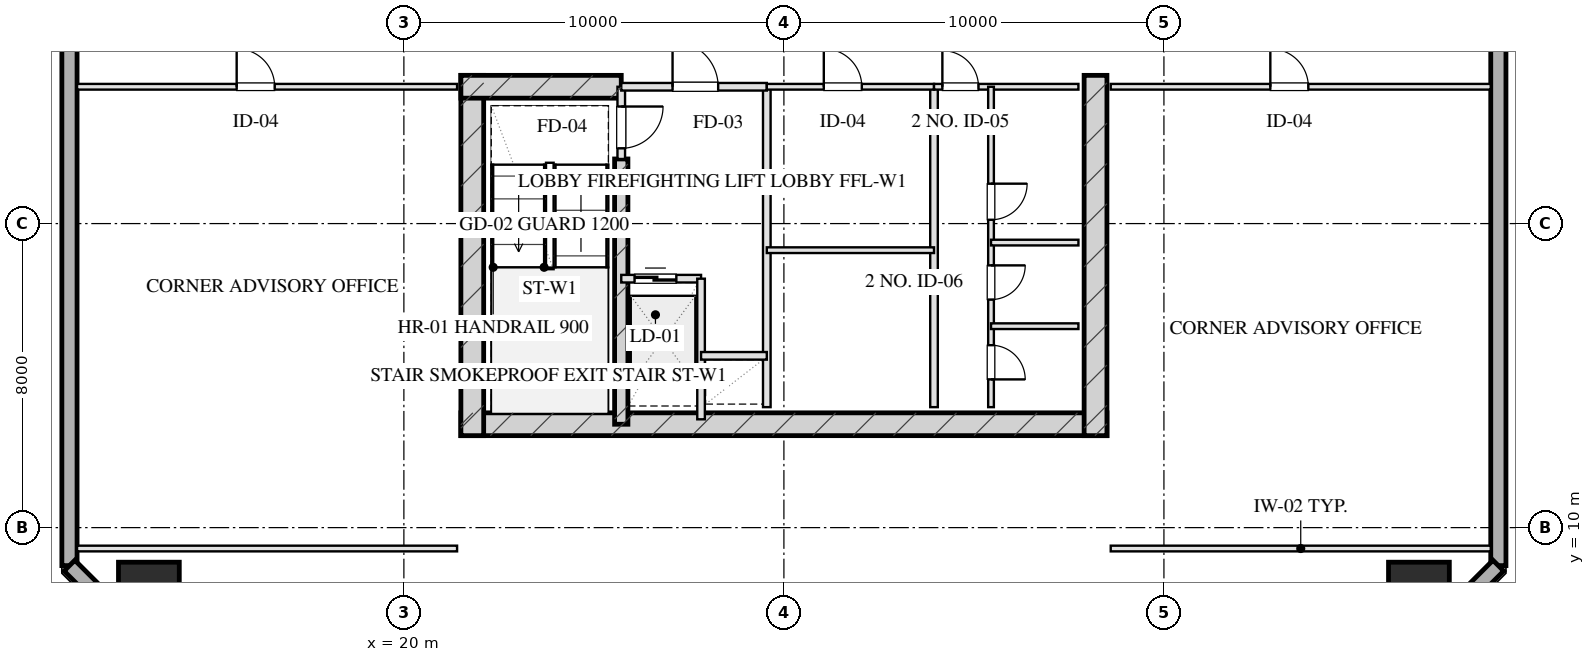
"""IFC4 building model, lengths in metres.
Left out: names, types, materials, properties, quantities, classifications, styles, units other than length and angle.
Written with IfcOpenShell. Run it as: python <this file> out.ifc"""

import sys

from ifc_helpers import new_model, si_unit, direction, frame, frame_2d, origin, origin_2d, place, context, subcontext, project, spatial, rectangle, hollow_rectangle, extrude, element, fill, save


model = new_model("IFC4")
c1 = context("Model", 3, precision=1e-05, world=origin(), true_north=direction((0.0, 1.0)))
c2 = subcontext(c1, "Body", "Model", "MODEL_VIEW")
j1 = project(units=[si_unit("LENGTHUNIT", "METRE"), si_unit("PLANEANGLEUNIT", "RADIAN")], contexts=[c1])
p1 = place(None, origin())
s1 = spatial("IfcSite", under=j1, at=p1, CompositionType="ELEMENT")
p2 = place(p1, origin())
s2 = spatial("IfcBuilding", under=s1, at=p2, CompositionType="ELEMENT")
p3 = place(p2, frame((0.0, 0.0, 106.95)))
s3 = spatial("IfcBuildingStorey", under=s2, at=p3, CompositionType="ELEMENT", Elevation=106.95)
p4 = place(p3, frame((21.5, 12.72, 0.0), z_axis=(0.0, 0.0, 1.0), x_axis=(1.0, 0.0, 0.0)))
e1 = element("IfcWall", 1, at=p4, inside=s3, PredefinedType="SHEAR", context=c2, shape_type="SweptSolid", body=[
    extrude(rectangle(XDim=17.0, YDim=0.6, at=frame_2d((8.5, 0.0))), origin(), (0.0, 0.0, 1.0), 3.45),
])
for number, where, z_axis, x_axis in (
    (2, (21.8, 21.9, 0.0), (0.0, 0.0, 1.0), (0.0, -1.0, 0.0)),
    (3, (38.2, 21.9, 0.0), (0.0, 0.0, 1.0), (0.0, -1.0, 0.0)),
):
    element("IfcWall", number, at=place(p3, frame(where, z_axis=z_axis, x_axis=x_axis)), inside=s3, PredefinedType="SHEAR", context=c2, shape_type="SweptSolid", body=[
        extrude(rectangle(XDim=9.48, YDim=0.6, at=frame_2d((4.74, 0.0))), origin(), (0.0, 0.0, 1.0), 3.45),
    ])
p5 = place(p3, frame((25.72, 19.7, 0.0), z_axis=(0.0, 0.0, 1.0), x_axis=(0.0, -1.0, 0.0)))
e4 = element("IfcWall", 4, at=p5, inside=s3, PredefinedType="SHEAR", context=c2, shape_type="SweptSolid", body=[
    extrude(rectangle(XDim=6.98, YDim=0.35, at=frame_2d((3.49, 0.0))), origin(), (0.0, 0.0, 1.0), 3.45),
])
p6 = place(p3, frame((21.5, 21.6, 0.0), z_axis=(0.0, 0.0, 1.0), x_axis=(1.0, 0.0, 0.0)))
e5 = element("IfcWall", 5, at=p6, inside=s3, PredefinedType="SHEAR", context=c2, shape_type="SweptSolid", body=[
    extrude(rectangle(XDim=4.22, YDim=0.6, at=frame_2d((2.11, 0.0))), origin(), (0.0, 0.0, 1.0), 3.45),
])
for number, where, z_axis, x_axis in (
    (6, (13.29, 8.29, 0.0), (0.0, 0.0, 1.0), (1.0, 0.0, 0.0)),
    (7, (46.71, 8.29, 0.0), (0.0, 0.0, 1.0), (1.0, 0.0, 0.0)),
):
    element("IfcColumn", number, at=place(p3, frame(where, z_axis=z_axis, x_axis=x_axis)), inside=s3, PredefinedType="COLUMN", context=c2, shape_type="SweptSolid", body=[
        extrude(hollow_rectangle(XDim=1.6, YDim=1.6, WallThickness=0.055, at=origin_2d()), origin(), (0.0, 0.0, 1.0), 3.451),
    ])
p7 = place(p3, frame((11.2, 9.0, 0.0), z_axis=(0.0, 0.0, 1.0), x_axis=(0.0, 1.0, 0.0)))
e8 = element("IfcWall", 8, at=p7, inside=s3, PredefinedType="SOLIDWALL", context=c2, shape_type="SweptSolid", body=[
    extrude(rectangle(XDim=50.0, YDim=0.4, at=frame_2d((25.0, 0.0))), origin(), (0.0, 0.0, 1.0), 2.61),
])
p8 = place(p7, frame((26.4, 0.0, 0.75)))
e9 = element("IfcOpeningElement", 9, at=p8, cuts=e8, PredefinedType="OPENING", context=c2, shape_type="SweptSolid", body=[
    extrude(rectangle(XDim=2.4, YDim=1.46, at=frame_2d((1.2, 0.73))), frame((0.0, 0.21, 0.0), z_axis=(0.0, -1.0, 0.0), x_axis=(1.0, 0.0, 0.0)), (0.0, 0.0, 1.0), 0.42),
])
p9 = place(p3, frame((48.8, 59.0, 0.0), z_axis=(0.0, 0.0, 1.0), x_axis=(0.0, -1.0, 0.0)))
e10 = element("IfcWall", 10, at=p9, inside=s3, PredefinedType="SOLIDWALL", context=c2, shape_type="SweptSolid", body=[
    extrude(rectangle(XDim=50.0, YDim=0.4, at=frame_2d((25.0, 0.0))), origin(), (0.0, 0.0, 1.0), 2.61),
])
p10 = place(p9, frame((30.2, 0.0, 0.75)))
e11 = element("IfcOpeningElement", 11, at=p10, cuts=e10, PredefinedType="OPENING", context=c2, shape_type="SweptSolid", body=[
    extrude(rectangle(XDim=2.4, YDim=1.46, at=frame_2d((1.2, 0.73))), frame((0.0, 0.21, 0.0), z_axis=(0.0, -1.0, 0.0), x_axis=(1.0, 0.0, 0.0)), (0.0, 0.0, 1.0), 0.42),
])
p11 = place(p9, frame((17.4, 0.0, 0.75)))
e12 = element("IfcOpeningElement", 12, at=p11, cuts=e10, PredefinedType="OPENING", context=c2, shape_type="SweptSolid", body=[
    extrude(rectangle(XDim=2.4, YDim=1.46, at=frame_2d((1.2, 0.73))), frame((0.0, 0.21, 0.0), z_axis=(0.0, -1.0, 0.0), x_axis=(1.0, 0.0, 0.0)), (0.0, 0.0, 1.0), 0.42),
])
for number, where, z_axis, x_axis in (
    (13, (48.8, 9.0, 0.0), (0.0, 0.0, 1.0), (-0.707, -0.707, 0.0)),
    (14, (14.0, 6.2, 0.0), (0.0, 0.0, 1.0), (-0.707, 0.707, 0.0)),
):
    element("IfcWall", number, at=place(p3, frame(where, z_axis=z_axis, x_axis=x_axis)), inside=s3, PredefinedType="SOLIDWALL", context=c2, shape_type="SweptSolid", body=[
        extrude(rectangle(XDim=3.96, YDim=0.4, at=frame_2d((1.98, 0.0))), origin(), (0.0, 0.0, 1.0), 2.61),
    ])
p12 = place(p3, frame((25.72, 21.6, 0.0), z_axis=(0.0, 0.0, 1.0), x_axis=(0.0, -1.0, 0.0)))
e15 = element("IfcWall", 15, at=p12, inside=s3, PredefinedType="PARTITIONING", context=c2, shape_type="SweptSolid", body=[
    extrude(rectangle(XDim=1.9, YDim=0.2, at=frame_2d((0.95, 0.0))), origin(), (0.0, 0.0, 1.0), 3.175),
])
p13 = place(p12, frame((0.52, 0.0, 0.0)))
e16 = element("IfcOpeningElement", 16, at=p13, cuts=e15, PredefinedType="OPENING", context=c2, shape_type="SweptSolid", body=[
    extrude(rectangle(XDim=1.1, YDim=2.05, at=frame_2d((0.55, 1.025))), frame((0.0, 0.11, 0.0), z_axis=(0.0, -1.0, 0.0), x_axis=(1.0, 0.0, 0.0)), (0.0, 0.0, 1.0), 0.22),
])
p14 = place(p3, frame((29.55, 21.6, 0.0), z_axis=(0.0, 0.0, 1.0), x_axis=(0.0, -1.0, 0.0)))
e17 = element("IfcWall", 17, at=p14, inside=s3, PredefinedType="PARTITIONING", context=c2, shape_type="SweptSolid", body=[
    extrude(rectangle(XDim=8.43, YDim=0.2, at=frame_2d((4.215, 0.0))), origin(), (0.0, 0.0, 1.0), 3.175),
])
p15 = place(p3, frame((25.72, 21.6, 0.0), z_axis=(0.0, 0.0, 1.0), x_axis=(1.0, 0.0, 0.0)))
e18 = element("IfcWall", 18, at=p15, inside=s3, PredefinedType="PARTITIONING", context=c2, shape_type="SweptSolid", body=[
    extrude(rectangle(XDim=3.83, YDim=0.2, at=frame_2d((1.915, 0.0))), origin(), (0.0, 0.0, 1.0), 3.175),
])
p16 = place(p15, frame((1.35, 0.0, 0.0)))
e19 = element("IfcOpeningElement", 19, at=p16, cuts=e18, PredefinedType="OPENING", context=c2, shape_type="SweptSolid", body=[
    extrude(rectangle(XDim=1.2, YDim=2.05, at=frame_2d((0.6, 1.025))), frame((0.0, 0.11, 0.0), z_axis=(0.0, -1.0, 0.0), x_axis=(1.0, 0.0, 0.0)), (0.0, 0.0, 1.0), 0.22),
])
p17 = place(p3, frame((25.72, 16.55, 0.0), z_axis=(0.0, 0.0, 1.0), x_axis=(1.0, 0.0, 0.0)))
e20 = element("IfcWall", 20, at=p17, inside=s3, PredefinedType="PARTITIONING", context=c2, shape_type="SweptSolid", body=[
    extrude(rectangle(XDim=2.1, YDim=0.2, at=frame_2d((1.05, 0.0))), origin(), (0.0, 0.0, 1.0), 3.175),
])
p18 = place(p17, frame((0.35, 0.0, 0.0)))
e21 = element("IfcOpeningElement", 21, at=p18, cuts=e20, PredefinedType="OPENING", context=c2, shape_type="SweptSolid", body=[
    extrude(rectangle(XDim=1.1, YDim=2.05, at=frame_2d((0.55, 1.025))), frame((0.0, 0.11, 0.0), z_axis=(0.0, -1.0, 0.0), x_axis=(1.0, 0.0, 0.0)), (0.0, 0.0, 1.0), 0.22),
])
p19 = place(p3, frame((27.82, 16.55, 0.0), z_axis=(0.0, 0.0, 1.0), x_axis=(0.0, -1.0, 0.0)))
e22 = element("IfcWall", 22, at=p19, inside=s3, PredefinedType="PARTITIONING", context=c2, shape_type="SweptSolid", body=[
    extrude(rectangle(XDim=3.7, YDim=0.2, at=frame_2d((1.85, 0.0))), origin(), (0.0, 0.0, 1.0), 3.175),
])
p20 = place(p3, frame((27.82, 14.52, 0.0), z_axis=(0.0, 0.0, 1.0), x_axis=(1.0, 0.0, 0.0)))
e23 = element("IfcWall", 23, at=p20, inside=s3, PredefinedType="PARTITIONING", context=c2, shape_type="SweptSolid", body=[
    extrude(rectangle(XDim=1.73, YDim=0.2, at=frame_2d((0.865, 0.0))), origin(), (0.0, 0.0, 1.0), 3.175),
])
p21 = place(p3, frame((33.95, 21.6, 0.0), z_axis=(0.0, 0.0, 1.0), x_axis=(0.0, -1.0, 0.0)))
e24 = element("IfcWall", 24, at=p21, inside=s3, PredefinedType="PARTITIONING", context=c2, shape_type="SweptSolid", body=[
    extrude(rectangle(XDim=8.43, YDim=0.2, at=frame_2d((4.215, 0.0))), origin(), (0.0, 0.0, 1.0), 3.175),
])
p22 = place(p3, frame((29.55, 21.6, 0.0), z_axis=(0.0, 0.0, 1.0), x_axis=(1.0, 0.0, 0.0)))
e25 = element("IfcWall", 25, at=p22, inside=s3, PredefinedType="PARTITIONING", context=c2, shape_type="SweptSolid", body=[
    extrude(rectangle(XDim=4.4, YDim=0.15, at=frame_2d((2.2, 0.0))), origin(), (0.0, 0.0, 1.0), 3.175),
])
p23 = place(p22, frame((1.5, 0.0, 0.0)))
e26 = element("IfcOpeningElement", 26, at=p23, cuts=e25, PredefinedType="OPENING", context=c2, shape_type="SweptSolid", body=[
    extrude(rectangle(XDim=1.0, YDim=2.05, at=frame_2d((0.5, 1.025))), frame((0.0, 0.085, 0.0), z_axis=(0.0, -1.0, 0.0), x_axis=(1.0, 0.0, 0.0)), (0.0, 0.0, 1.0), 0.17),
])
p24 = place(p3, frame((29.55, 17.3, 0.0), z_axis=(0.0, 0.0, 1.0), x_axis=(1.0, 0.0, 0.0)))
e27 = element("IfcWall", 27, at=p24, inside=s3, PredefinedType="PARTITIONING", context=c2, shape_type="SweptSolid", body=[
    extrude(rectangle(XDim=4.4, YDim=0.15, at=frame_2d((2.2, 0.0))), origin(), (0.0, 0.0, 1.0), 3.175),
])
p25 = place(p3, frame((33.95, 21.6, 0.0), z_axis=(0.0, 0.0, 1.0), x_axis=(1.0, 0.0, 0.0)))
e28 = element("IfcWall", 28, at=p25, inside=s3, PredefinedType="PARTITIONING", context=c2, shape_type="SweptSolid", body=[
    extrude(rectangle(XDim=3.8, YDim=0.15, at=frame_2d((1.9, 0.0))), origin(), (0.0, 0.0, 1.0), 3.175),
])
p26 = place(p25, frame((0.22, 0.0, 0.0)))
e29 = element("IfcOpeningElement", 29, at=p26, cuts=e28, PredefinedType="OPENING", context=c2, shape_type="SweptSolid", body=[
    extrude(rectangle(XDim=0.95, YDim=2.05, at=frame_2d((0.475, 1.025))), frame((0.0, 0.085, 0.0), z_axis=(0.0, -1.0, 0.0), x_axis=(1.0, 0.0, 0.0)), (0.0, 0.0, 1.0), 0.17),
])
p27 = place(p3, frame((35.45, 21.6, 0.0), z_axis=(0.0, 0.0, 1.0), x_axis=(0.0, -1.0, 0.0)))
e30 = element("IfcWall", 30, at=p27, inside=s3, PredefinedType="PARTITIONING", context=c2, shape_type="SweptSolid", body=[
    extrude(rectangle(XDim=8.43, YDim=0.15, at=frame_2d((4.215, 0.0))), origin(), (0.0, 0.0, 1.0), 2.815),
])
p28 = place(p27, frame((2.55, 0.0, 0.0)))
e31 = element("IfcOpeningElement", 31, at=p28, cuts=e30, PredefinedType="OPENING", context=c2, shape_type="SweptSolid", body=[
    extrude(rectangle(XDim=0.95, YDim=2.05, at=frame_2d((0.475, 1.025))), frame((0.0, 0.085, 0.0), z_axis=(0.0, -1.0, 0.0), x_axis=(1.0, 0.0, 0.0)), (0.0, 0.0, 1.0), 0.17),
])
p29 = place(p27, frame((4.7, 0.0, 0.0)))
e32 = element("IfcOpeningElement", 32, at=p29, cuts=e30, PredefinedType="OPENING", context=c2, shape_type="SweptSolid", body=[
    extrude(rectangle(XDim=0.9, YDim=2.05, at=frame_2d((0.45, 1.025))), frame((0.0, 0.085, 0.0), z_axis=(0.0, -1.0, 0.0), x_axis=(1.0, 0.0, 0.0)), (0.0, 0.0, 1.0), 0.17),
])
p30 = place(p27, frame((6.8, 0.0, 0.0)))
e33 = element("IfcOpeningElement", 33, at=p30, cuts=e30, PredefinedType="OPENING", context=c2, shape_type="SweptSolid", body=[
    extrude(rectangle(XDim=0.9, YDim=2.05, at=frame_2d((0.45, 1.025))), frame((0.0, 0.085, 0.0), z_axis=(0.0, -1.0, 0.0), x_axis=(1.0, 0.0, 0.0)), (0.0, 0.0, 1.0), 0.17),
])
for number, where, z_axis, x_axis in (
    (34, (35.45, 17.5, 0.0), (0.0, 0.0, 1.0), (1.0, 0.0, 0.0)),
    (35, (35.45, 15.3, 0.0), (0.0, 0.0, 1.0), (1.0, 0.0, 0.0)),
):
    element("IfcWall", number, at=place(p3, frame(where, z_axis=z_axis, x_axis=x_axis)), inside=s3, PredefinedType="PARTITIONING", context=c2, shape_type="SweptSolid", body=[
        extrude(rectangle(XDim=2.3, YDim=0.15, at=frame_2d((1.15, 0.0))), origin(), (0.0, 0.0, 1.0), 3.175),
    ])
p31 = place(p3, frame((11.4, 9.45, 0.0), z_axis=(0.0, 0.0, 1.0), x_axis=(1.0, 0.0, 0.0)))
e36 = element("IfcWall", 36, at=p31, inside=s3, PredefinedType="PARTITIONING", context=c2, shape_type="SweptSolid", body=[
    extrude(rectangle(XDim=10.0, YDim=0.15, at=frame_2d((5.0, 0.0))), origin(), (0.0, 0.0, 1.0), 3.175),
])
p32 = place(p3, frame((11.4, 21.6, 0.0), z_axis=(0.0, 0.0, 1.0), x_axis=(1.0, 0.0, 0.0)))
e37 = element("IfcWall", 37, at=p32, inside=s3, PredefinedType="PARTITIONING", context=c2, shape_type="SweptSolid", body=[
    extrude(rectangle(XDim=10.0, YDim=0.15, at=frame_2d((5.0, 0.0))), origin(), (0.0, 0.0, 1.0), 3.175),
])
p33 = place(p32, frame((4.2, 0.0, 0.0)))
e38 = element("IfcOpeningElement", 38, at=p33, cuts=e37, PredefinedType="OPENING", context=c2, shape_type="SweptSolid", body=[
    extrude(rectangle(XDim=1.0, YDim=2.05, at=frame_2d((0.5, 1.025))), frame((0.0, 0.085, 0.0), z_axis=(0.0, -1.0, 0.0), x_axis=(1.0, 0.0, 0.0)), (0.0, 0.0, 1.0), 0.17),
])
p34 = place(p3, frame((38.6, 9.45, 0.0), z_axis=(0.0, 0.0, 1.0), x_axis=(1.0, 0.0, 0.0)))
e39 = element("IfcWall", 39, at=p34, inside=s3, PredefinedType="PARTITIONING", context=c2, shape_type="SweptSolid", body=[
    extrude(rectangle(XDim=10.0, YDim=0.15, at=frame_2d((5.0, 0.0))), origin(), (0.0, 0.0, 1.0), 3.175),
])
p35 = place(p3, frame((38.6, 21.6, 0.0), z_axis=(0.0, 0.0, 1.0), x_axis=(1.0, 0.0, 0.0)))
e40 = element("IfcWall", 40, at=p35, inside=s3, PredefinedType="PARTITIONING", context=c2, shape_type="SweptSolid", body=[
    extrude(rectangle(XDim=10.0, YDim=0.15, at=frame_2d((5.0, 0.0))), origin(), (0.0, 0.0, 1.0), 3.175),
])
p36 = place(p35, frame((4.2, 0.0, 0.0)))
e41 = element("IfcOpeningElement", 41, at=p36, cuts=e40, PredefinedType="OPENING", context=c2, shape_type="SweptSolid", body=[
    extrude(rectangle(XDim=1.0, YDim=2.05, at=frame_2d((0.5, 1.025))), frame((0.0, 0.085, 0.0), z_axis=(0.0, -1.0, 0.0), x_axis=(1.0, 0.0, 0.0)), (0.0, 0.0, 1.0), 0.17),
])
p37 = place(p13, origin())
e42 = element("IfcDoor", 42, at=p37, inside=s3, OperationType="SINGLE_SWING_LEFT", PredefinedType="DOOR", context=c2, shape_type="SweptSolid", body=[
    extrude(rectangle(XDim=1.1, YDim=2.05, at=frame_2d((0.55, 1.025))), frame((0.0, 0.025, 0.0), z_axis=(0.0, -1.0, 0.0), x_axis=(1.0, 0.0, 0.0)), (0.0, 0.0, 1.0), 0.05),
])
fill(e16, e42)
p38 = place(p16, origin())
e43 = element("IfcDoor", 43, at=p38, inside=s3, OperationType="SINGLE_SWING_LEFT", PredefinedType="DOOR", context=c2, shape_type="SweptSolid", body=[
    extrude(rectangle(XDim=1.2, YDim=2.05, at=frame_2d((0.6, 1.025))), frame((0.0, 0.025, 0.0), z_axis=(0.0, -1.0, 0.0), x_axis=(1.0, 0.0, 0.0)), (0.0, 0.0, 1.0), 0.05),
])
fill(e19, e43)
p39 = place(p18, origin())
e44 = element("IfcDoor", 44, at=p39, inside=s3, OperationType="DOUBLE_DOOR_SLIDING", PredefinedType="DOOR", context=c2, shape_type="SweptSolid", body=[
    extrude(rectangle(XDim=1.1, YDim=2.05, at=frame_2d((0.55, 1.025))), frame((0.0, 0.025, 0.0), z_axis=(0.0, -1.0, 0.0), x_axis=(1.0, 0.0, 0.0)), (0.0, 0.0, 1.0), 0.05),
])
fill(e21, e44)
p40 = place(p23, origin())
e45 = element("IfcDoor", 45, at=p40, inside=s3, OperationType="SINGLE_SWING_LEFT", PredefinedType="DOOR", context=c2, shape_type="SweptSolid", body=[
    extrude(rectangle(XDim=1.0, YDim=2.05, at=frame_2d((0.5, 1.025))), frame((0.0, 0.025, 0.0), z_axis=(0.0, -1.0, 0.0), x_axis=(1.0, 0.0, 0.0)), (0.0, 0.0, 1.0), 0.05),
])
fill(e26, e45)
p41 = place(p26, origin())
e46 = element("IfcDoor", 46, at=p41, inside=s3, OperationType="SINGLE_SWING_LEFT", PredefinedType="DOOR", context=c2, shape_type="SweptSolid", body=[
    extrude(rectangle(XDim=0.95, YDim=2.05, at=frame_2d((0.475, 1.025))), frame((0.0, 0.025, 0.0), z_axis=(0.0, -1.0, 0.0), x_axis=(1.0, 0.0, 0.0)), (0.0, 0.0, 1.0), 0.05),
])
fill(e29, e46)
p42 = place(p28, origin())
e47 = element("IfcDoor", 47, at=p42, inside=s3, OperationType="SINGLE_SWING_LEFT", PredefinedType="DOOR", context=c2, shape_type="SweptSolid", body=[
    extrude(rectangle(XDim=0.95, YDim=2.05, at=frame_2d((0.475, 1.025))), frame((0.0, 0.025, 0.0), z_axis=(0.0, -1.0, 0.0), x_axis=(1.0, 0.0, 0.0)), (0.0, 0.0, 1.0), 0.05),
])
fill(e31, e47)
p43 = place(p29, origin())
e48 = element("IfcDoor", 48, at=p43, inside=s3, OperationType="SINGLE_SWING_LEFT", PredefinedType="DOOR", context=c2, shape_type="SweptSolid", body=[
    extrude(rectangle(XDim=0.9, YDim=2.05, at=frame_2d((0.45, 1.025))), frame((0.0, 0.025, 0.0), z_axis=(0.0, -1.0, 0.0), x_axis=(1.0, 0.0, 0.0)), (0.0, 0.0, 1.0), 0.05),
])
fill(e32, e48)
p44 = place(p30, origin())
e49 = element("IfcDoor", 49, at=p44, inside=s3, OperationType="SINGLE_SWING_RIGHT", PredefinedType="DOOR", context=c2, shape_type="SweptSolid", body=[
    extrude(rectangle(XDim=0.9, YDim=2.05, at=frame_2d((0.45, 1.025))), frame((0.0, 0.025, 0.0), z_axis=(0.0, -1.0, 0.0), x_axis=(1.0, 0.0, 0.0)), (0.0, 0.0, 1.0), 0.05),
])
fill(e33, e49)
p45 = place(p33, origin())
e50 = element("IfcDoor", 50, at=p45, inside=s3, OperationType="SINGLE_SWING_LEFT", PredefinedType="DOOR", context=c2, shape_type="SweptSolid", body=[
    extrude(rectangle(XDim=1.0, YDim=2.05, at=frame_2d((0.5, 1.025))), frame((0.0, 0.025, 0.0), z_axis=(0.0, -1.0, 0.0), x_axis=(1.0, 0.0, 0.0)), (0.0, 0.0, 1.0), 0.05),
])
fill(e38, e50)
p46 = place(p36, origin())
e51 = element("IfcDoor", 51, at=p46, inside=s3, OperationType="SINGLE_SWING_LEFT", PredefinedType="DOOR", context=c2, shape_type="SweptSolid", body=[
    extrude(rectangle(XDim=1.0, YDim=2.05, at=frame_2d((0.5, 1.025))), frame((0.0, 0.025, 0.0), z_axis=(0.0, -1.0, 0.0), x_axis=(1.0, 0.0, 0.0)), (0.0, 0.0, 1.0), 0.05),
])
fill(e41, e51)
save(model, sys.argv[1])
